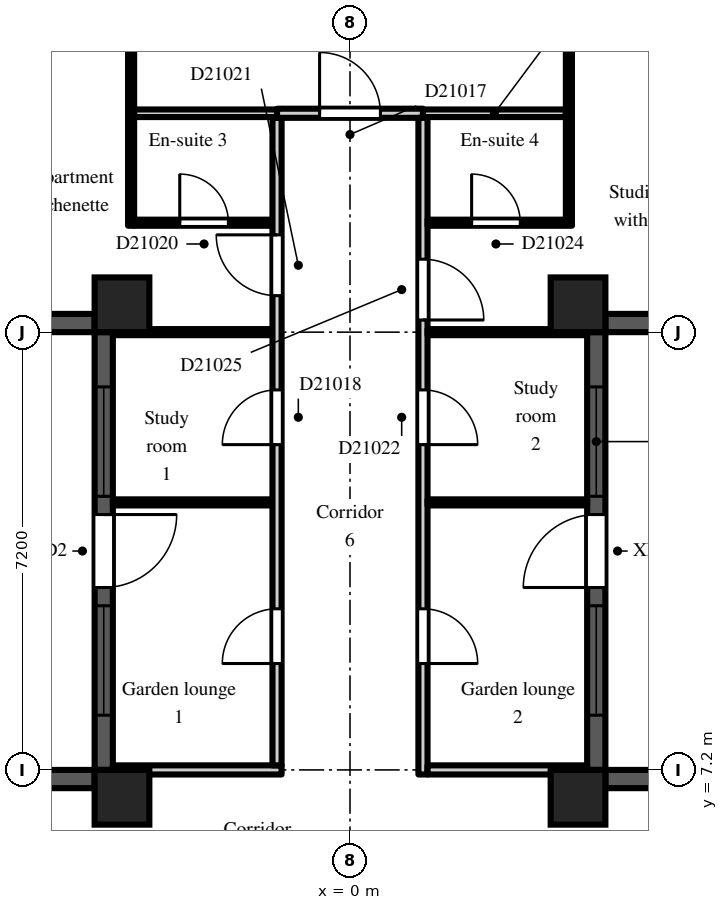
"""IFC4 building model, lengths in metres.
Left out: names, types, materials, properties, quantities, classifications, styles, units other than length and angle.
Written with IfcOpenShell. Run it as: python <this file> out.ifc"""

import sys

from ifc_helpers import new_model, si_unit, direction, frame, frame_2d, origin, origin_2d, place, context, subcontext, project, spatial, rectangle, extrude, element, fill, save


model = new_model("IFC4")
c1 = context("Model", 3, precision=1e-05, world=origin(), true_north=direction((0.0, 1.0)))
c2 = subcontext(c1, "Body", "Model", "MODEL_VIEW")
j1 = project(units=[si_unit("LENGTHUNIT", "METRE"), si_unit("PLANEANGLEUNIT", "RADIAN")], contexts=[c1])
p1 = place(None, origin())
s1 = spatial("IfcSite", under=j1, at=p1, CompositionType="ELEMENT")
p2 = place(p1, origin())
s2 = spatial("IfcBuilding", under=s1, at=p2, CompositionType="ELEMENT")
p3 = place(p2, frame((0.0, 0.0, 147.3)))
s3 = spatial("IfcBuildingStorey", under=s2, at=p3, CompositionType="ELEMENT", Elevation=147.3)
for number, where, z_axis, x_axis in (
    (1, (-3.75, 6.75, 0.0), (0.0, 0.0, 1.0), (1.0, 0.0, 0.0)),
    (2, (-3.75, 14.85, 0.0), (0.0, 0.0, 1.0), (1.0, 0.0, 0.0)),
    (3, (3.75, 6.75, 0.0), (0.0, 0.0, 1.0), (1.0, 0.0, 0.0)),
    (4, (3.75, 14.85, 0.0), (0.0, 0.0, 1.0), (1.0, 0.0, 0.0)),
):
    element("IfcColumn", number, at=place(p3, frame(where, z_axis=z_axis, x_axis=x_axis)), inside=s3, PredefinedType="COLUMN", context=c2, shape_type="SweptSolid", body=[
        extrude(rectangle(XDim=0.9, YDim=0.9, at=origin_2d()), origin(), (0.0, 0.0, 1.0), 3.0),
    ])
p4 = place(p3, frame((7.2, 7.05, 0.0), z_axis=(0.0, 0.0, 1.0), x_axis=(-1.0, 0.0, 0.0)))
e5 = element("IfcWall", 5, at=p4, inside=s3, PredefinedType="SOLIDWALL", context=c2, shape_type="SweptSolid", body=[
    extrude(rectangle(XDim=3.0, YDim=0.3, at=frame_2d((1.5, 0.0))), origin(), (0.0, 0.0, 1.0), 2.2),
])
p5 = place(p3, frame((4.05, 7.2, 0.0), z_axis=(0.0, 0.0, 1.0), x_axis=(0.0, 1.0, 0.0)))
e6 = element("IfcWall", 6, at=p5, inside=s3, PredefinedType="SOLIDWALL", context=c2, shape_type="SweptSolid", body=[
    extrude(rectangle(XDim=7.2, YDim=0.3, at=frame_2d((3.6, 0.0))), origin(), (0.0, 0.0, 1.0), 2.2),
])
p6 = place(p5, frame((3.0, 0.0, 0.0)))
e7 = element("IfcOpeningElement", 7, at=p6, cuts=e6, PredefinedType="OPENING", context=c2, shape_type="SweptSolid", body=[
    extrude(rectangle(XDim=1.2, YDim=2.05, at=frame_2d((0.6, 1.025))), frame((0.0, 0.16, 0.0), z_axis=(0.0, -1.0, 0.0), x_axis=(1.0, 0.0, 0.0)), (0.0, 0.0, 1.0), 0.32),
])
p7 = place(p5, frame((0.9, 0.0, 0.2)))
e8 = element("IfcOpeningElement", 8, at=p7, cuts=e6, PredefinedType="OPENING", context=c2, shape_type="SweptSolid", body=[
    extrude(rectangle(XDim=1.8, YDim=1.85, at=frame_2d((0.9, 0.925))), frame((0.0, 0.16, 0.0), z_axis=(0.0, -1.0, 0.0), x_axis=(1.0, 0.0, 0.0)), (0.0, 0.0, 1.0), 0.32),
])
p8 = place(p5, frame((4.5, 0.0, 0.2)))
e9 = element("IfcOpeningElement", 9, at=p8, cuts=e6, PredefinedType="OPENING", context=c2, shape_type="SweptSolid", body=[
    extrude(rectangle(XDim=1.8, YDim=1.85, at=frame_2d((0.9, 0.925))), frame((0.0, 0.16, 0.0), z_axis=(0.0, -1.0, 0.0), x_axis=(1.0, 0.0, 0.0)), (0.0, 0.0, 1.0), 0.32),
])
for number, where, z_axis, x_axis in (
    (10, (4.2, 14.55, 0.0), (0.0, 0.0, 1.0), (1.0, 0.0, 0.0)),
    (11, (-6.3, 14.55, 0.0), (0.0, 0.0, 1.0), (1.0, 0.0, 0.0)),
):
    element("IfcWall", number, at=place(p3, frame(where, z_axis=z_axis, x_axis=x_axis)), inside=s3, PredefinedType="SOLIDWALL", context=c2, shape_type="SweptSolid", body=[
        extrude(rectangle(XDim=2.1, YDim=0.3, at=frame_2d((1.05, 0.0))), origin(), (0.0, 0.0, 1.0), 2.2),
    ])
p9 = place(p3, frame((-4.05, 14.4, 0.0), z_axis=(0.0, 0.0, 1.0), x_axis=(0.0, -1.0, 0.0)))
e12 = element("IfcWall", 12, at=p9, inside=s3, PredefinedType="SOLIDWALL", context=c2, shape_type="SweptSolid", body=[
    extrude(rectangle(XDim=7.2, YDim=0.3, at=frame_2d((3.6, 0.0))), origin(), (0.0, 0.0, 1.0), 2.2),
])
p10 = place(p9, frame((3.0, 0.0, 0.0)))
e13 = element("IfcOpeningElement", 13, at=p10, cuts=e12, PredefinedType="OPENING", context=c2, shape_type="SweptSolid", body=[
    extrude(rectangle(XDim=1.2, YDim=2.05, at=frame_2d((0.6, 1.025))), frame((0.0, 0.16, 0.0), z_axis=(0.0, -1.0, 0.0), x_axis=(1.0, 0.0, 0.0)), (0.0, 0.0, 1.0), 0.32),
])
p11 = place(p9, frame((0.9, 0.0, 0.2)))
e14 = element("IfcOpeningElement", 14, at=p11, cuts=e12, PredefinedType="OPENING", context=c2, shape_type="SweptSolid", body=[
    extrude(rectangle(XDim=1.8, YDim=1.85, at=frame_2d((0.9, 0.925))), frame((0.0, 0.16, 0.0), z_axis=(0.0, -1.0, 0.0), x_axis=(1.0, 0.0, 0.0)), (0.0, 0.0, 1.0), 0.32),
])
p12 = place(p9, frame((4.5, 0.0, 0.2)))
e15 = element("IfcOpeningElement", 15, at=p12, cuts=e12, PredefinedType="OPENING", context=c2, shape_type="SweptSolid", body=[
    extrude(rectangle(XDim=1.8, YDim=1.85, at=frame_2d((0.9, 0.925))), frame((0.0, 0.16, 0.0), z_axis=(0.0, -1.0, 0.0), x_axis=(1.0, 0.0, 0.0)), (0.0, 0.0, 1.0), 0.32),
])
p13 = place(p3, frame((-4.2, 7.05, 0.0), z_axis=(0.0, 0.0, 1.0), x_axis=(-1.0, 0.0, 0.0)))
e16 = element("IfcWall", 16, at=p13, inside=s3, PredefinedType="SOLIDWALL", context=c2, shape_type="SweptSolid", body=[
    extrude(rectangle(XDim=3.0, YDim=0.3, at=frame_2d((1.5, 0.0))), origin(), (0.0, 0.0, 1.0), 2.2),
])
p14 = place(p3, frame((-3.9, 7.2, 0.0), z_axis=(0.0, 0.0, 1.0), x_axis=(1.0, 0.0, 0.0)))
e17 = element("IfcWall", 17, at=p14, inside=s3, PredefinedType="PARTITIONING", context=c2, shape_type="SweptSolid", body=[
    extrude(rectangle(XDim=2.775, YDim=0.15, at=frame_2d((1.387, 0.0))), origin(), (0.0, 0.0, 1.0), 2.6),
])
for number, where, z_axis, x_axis in (
    (18, (-3.9, 11.6, 0.0), (0.0, 0.0, 1.0), (1.0, 0.0, 0.0)),
    (19, (-3.9, 14.4, 0.0), (0.0, 0.0, 1.0), (1.0, 0.0, 0.0)),
):
    element("IfcWall", number, at=place(p3, frame(where, z_axis=z_axis, x_axis=x_axis)), inside=s3, PredefinedType="PARTITIONING", context=c2, shape_type="SweptSolid", body=[
        extrude(rectangle(XDim=2.625, YDim=0.1, at=frame_2d((1.312, 0.0))), origin(), (0.0, 0.0, 1.0), 2.6),
    ])
p15 = place(p3, frame((-3.6, 16.15, 0.0), z_axis=(0.0, 0.0, 1.0), x_axis=(0.0, 1.0, 0.0)))
e20 = element("IfcWall", 20, at=p15, inside=s3, PredefinedType="PARTITIONING", context=c2, shape_type="SweptSolid", body=[
    extrude(rectangle(XDim=3.35, YDim=0.1, at=frame_2d((1.675, 0.0))), origin(), (0.0, 0.0, 1.0), 2.6),
])
p16 = place(p3, frame((-3.55, 16.2, 0.0), z_axis=(0.0, 0.0, 1.0), x_axis=(1.0, 0.0, 0.0)))
e21 = element("IfcWall", 21, at=p16, inside=s3, PredefinedType="PARTITIONING", context=c2, shape_type="SweptSolid", body=[
    extrude(rectangle(XDim=2.275, YDim=0.1, at=frame_2d((1.138, 0.0))), origin(), (0.0, 0.0, 1.0), 2.6),
])
p17 = place(p16, frame((0.75, 0.0, 0.0)))
e22 = element("IfcOpeningElement", 22, at=p17, cuts=e21, PredefinedType="OPENING", context=c2, shape_type="SweptSolid", body=[
    extrude(rectangle(XDim=0.8, YDim=2.1, at=frame_2d((0.4, 1.05))), frame((0.0, 0.06, 0.0), z_axis=(0.0, -1.0, 0.0), x_axis=(1.0, 0.0, 0.0)), (0.0, 0.0, 1.0), 0.12),
])
p18 = place(p3, frame((-3.55, 18.0, 0.0), z_axis=(0.0, 0.0, 1.0), x_axis=(1.0, 0.0, 0.0)))
e23 = element("IfcWall", 23, at=p18, inside=s3, PredefinedType="PARTITIONING", context=c2, shape_type="SweptSolid", body=[
    extrude(rectangle(XDim=2.35, YDim=0.125, at=frame_2d((1.175, 0.0))), origin(), (0.0, 0.0, 1.0), 2.6),
])
p19 = place(p3, frame((-1.2, 7.275, 0.0), z_axis=(0.0, 0.0, 1.0), x_axis=(0.0, 1.0, 0.0)))
e24 = element("IfcWall", 24, at=p19, inside=s3, PredefinedType="PARTITIONING", context=c2, shape_type="SweptSolid", body=[
    extrude(rectangle(XDim=10.65, YDim=0.15, at=frame_2d((5.325, 0.0))), origin(), (0.0, 0.0, 1.0), 2.6),
])
p20 = place(p19, frame((5.275, 0.0, 0.0)))
e25 = element("IfcOpeningElement", 25, at=p20, cuts=e24, PredefinedType="OPENING", context=c2, shape_type="SweptSolid", body=[
    extrude(rectangle(XDim=0.9, YDim=2.1, at=frame_2d((0.45, 1.05))), frame((0.0, 0.085, 0.0), z_axis=(0.0, -1.0, 0.0), x_axis=(1.0, 0.0, 0.0)), (0.0, 0.0, 1.0), 0.17),
])
p21 = place(p19, frame((1.675, 0.0, 0.0)))
e26 = element("IfcOpeningElement", 26, at=p21, cuts=e24, PredefinedType="OPENING", context=c2, shape_type="SweptSolid", body=[
    extrude(rectangle(XDim=0.9, YDim=2.1, at=frame_2d((0.45, 1.05))), frame((0.0, 0.085, 0.0), z_axis=(0.0, -1.0, 0.0), x_axis=(1.0, 0.0, 0.0)), (0.0, 0.0, 1.0), 0.17),
])
p22 = place(p19, frame((7.725, 0.0, 0.0)))
e27 = element("IfcOpeningElement", 27, at=p22, cuts=e24, PredefinedType="OPENING", context=c2, shape_type="SweptSolid", body=[
    extrude(rectangle(XDim=1.0, YDim=2.1, at=frame_2d((0.5, 1.05))), frame((0.0, 0.085, 0.0), z_axis=(0.0, -1.0, 0.0), x_axis=(1.0, 0.0, 0.0)), (0.0, 0.0, 1.0), 0.17),
])
p23 = place(p3, frame((-1.2, 18.0, 0.0), z_axis=(0.0, 0.0, 1.0), x_axis=(1.0, 0.0, 0.0)))
e28 = element("IfcWall", 28, at=p23, inside=s3, PredefinedType="PARTITIONING", context=c2, shape_type="SweptSolid", body=[
    extrude(rectangle(XDim=2.4, YDim=0.15, at=frame_2d((1.2, 0.0))), origin(), (0.0, 0.0, 1.0), 2.6),
])
p24 = place(p23, frame((0.7, 0.0, 0.0)))
e29 = element("IfcOpeningElement", 29, at=p24, cuts=e28, PredefinedType="OPENING", context=c2, shape_type="SweptSolid", body=[
    extrude(rectangle(XDim=1.0, YDim=2.1, at=frame_2d((0.5, 1.05))), frame((0.0, 0.085, 0.0), z_axis=(0.0, -1.0, 0.0), x_axis=(1.0, 0.0, 0.0)), (0.0, 0.0, 1.0), 0.17),
])
p25 = place(p3, frame((1.2, 7.125, 0.0), z_axis=(0.0, 0.0, 1.0), x_axis=(0.0, 1.0, 0.0)))
e30 = element("IfcWall", 30, at=p25, inside=s3, PredefinedType="PARTITIONING", context=c2, shape_type="SweptSolid", body=[
    extrude(rectangle(XDim=10.8, YDim=0.15, at=frame_2d((5.4, 0.0))), origin(), (0.0, 0.0, 1.0), 2.6),
])
p26 = place(p25, frame((5.425, 0.0, 0.0)))
e31 = element("IfcOpeningElement", 31, at=p26, cuts=e30, PredefinedType="OPENING", context=c2, shape_type="SweptSolid", body=[
    extrude(rectangle(XDim=0.9, YDim=2.1, at=frame_2d((0.45, 1.05))), frame((0.0, 0.085, 0.0), z_axis=(0.0, -1.0, 0.0), x_axis=(1.0, 0.0, 0.0)), (0.0, 0.0, 1.0), 0.17),
])
p27 = place(p25, frame((1.825, 0.0, 0.0)))
e32 = element("IfcOpeningElement", 32, at=p27, cuts=e30, PredefinedType="OPENING", context=c2, shape_type="SweptSolid", body=[
    extrude(rectangle(XDim=0.9, YDim=2.1, at=frame_2d((0.45, 1.05))), frame((0.0, 0.085, 0.0), z_axis=(0.0, -1.0, 0.0), x_axis=(1.0, 0.0, 0.0)), (0.0, 0.0, 1.0), 0.17),
])
p28 = place(p25, frame((7.475, 0.0, 0.0)))
e33 = element("IfcOpeningElement", 33, at=p28, cuts=e30, PredefinedType="OPENING", context=c2, shape_type="SweptSolid", body=[
    extrude(rectangle(XDim=1.0, YDim=2.1, at=frame_2d((0.5, 1.05))), frame((0.0, 0.085, 0.0), z_axis=(0.0, -1.0, 0.0), x_axis=(1.0, 0.0, 0.0)), (0.0, 0.0, 1.0), 0.17),
])
p29 = place(p3, frame((1.275, 7.2, 0.0), z_axis=(0.0, 0.0, 1.0), x_axis=(1.0, 0.0, 0.0)))
e34 = element("IfcWall", 34, at=p29, inside=s3, PredefinedType="PARTITIONING", context=c2, shape_type="SweptSolid", body=[
    extrude(rectangle(XDim=2.625, YDim=0.15, at=frame_2d((1.312, 0.0))), origin(), (0.0, 0.0, 1.0), 2.6),
])
for number, where, z_axis, x_axis in (
    (35, (1.275, 11.6, 0.0), (0.0, 0.0, 1.0), (1.0, 0.0, 0.0)),
    (36, (1.275, 14.4, 0.0), (0.0, 0.0, 1.0), (1.0, 0.0, 0.0)),
):
    element("IfcWall", number, at=place(p3, frame(where, z_axis=z_axis, x_axis=x_axis)), inside=s3, PredefinedType="PARTITIONING", context=c2, shape_type="SweptSolid", body=[
        extrude(rectangle(XDim=2.625, YDim=0.1, at=frame_2d((1.312, 0.0))), origin(), (0.0, 0.0, 1.0), 2.6),
    ])
p30 = place(p3, frame((1.275, 16.2, 0.0), z_axis=(0.0, 0.0, 1.0), x_axis=(1.0, 0.0, 0.0)))
e37 = element("IfcWall", 37, at=p30, inside=s3, PredefinedType="PARTITIONING", context=c2, shape_type="SweptSolid", body=[
    extrude(rectangle(XDim=2.375, YDim=0.1, at=frame_2d((1.188, 0.0))), origin(), (0.0, 0.0, 1.0), 2.6),
])
p31 = place(p30, frame((0.725, 0.0, 0.0)))
e38 = element("IfcOpeningElement", 38, at=p31, cuts=e37, PredefinedType="OPENING", context=c2, shape_type="SweptSolid", body=[
    extrude(rectangle(XDim=0.8, YDim=2.1, at=frame_2d((0.4, 1.05))), frame((0.0, 0.06, 0.0), z_axis=(0.0, -1.0, 0.0), x_axis=(1.0, 0.0, 0.0)), (0.0, 0.0, 1.0), 0.12),
])
p32 = place(p3, frame((1.2, 18.0, 0.0), z_axis=(0.0, 0.0, 1.0), x_axis=(1.0, 0.0, 0.0)))
e39 = element("IfcWall", 39, at=p32, inside=s3, PredefinedType="PARTITIONING", context=c2, shape_type="SweptSolid", body=[
    extrude(rectangle(XDim=2.35, YDim=0.125, at=frame_2d((1.175, 0.0))), origin(), (0.0, 0.0, 1.0), 2.6),
])
p33 = place(p3, frame((3.6, 16.25, 0.0), z_axis=(0.0, 0.0, 1.0), x_axis=(0.0, 1.0, 0.0)))
e40 = element("IfcWall", 40, at=p33, inside=s3, PredefinedType="PARTITIONING", context=c2, shape_type="SweptSolid", body=[
    extrude(rectangle(XDim=3.25, YDim=0.1, at=frame_2d((1.625, 0.0))), origin(), (0.0, 0.0, 1.0), 2.6),
])
p34 = place(p6, origin())
e41 = element("IfcDoor", 41, at=p34, inside=s3, OperationType="SINGLE_SWING_LEFT", PredefinedType="DOOR", context=c2, shape_type="SweptSolid", body=[
    extrude(rectangle(XDim=1.2, YDim=2.05, at=frame_2d((0.6, 1.025))), frame((0.0, 0.025, 0.0), z_axis=(0.0, -1.0, 0.0), x_axis=(1.0, 0.0, 0.0)), (0.0, 0.0, 1.0), 0.05),
])
fill(e7, e41)
p35 = place(p7, origin())
e42 = element("IfcWindow", 42, at=p35, inside=s3, PartitioningType="SINGLE_PANEL", PredefinedType="WINDOW", context=c2, shape_type="SweptSolid", body=[
    extrude(rectangle(XDim=1.8, YDim=1.85, at=frame_2d((0.9, 0.925))), frame((0.0, 0.03, 0.0), z_axis=(0.0, -1.0, 0.0), x_axis=(1.0, 0.0, 0.0)), (0.0, 0.0, 1.0), 0.06),
])
fill(e8, e42)
p36 = place(p8, origin())
e43 = element("IfcWindow", 43, at=p36, inside=s3, PartitioningType="SINGLE_PANEL", PredefinedType="WINDOW", context=c2, shape_type="SweptSolid", body=[
    extrude(rectangle(XDim=1.8, YDim=1.85, at=frame_2d((0.9, 0.925))), frame((0.0, 0.03, 0.0), z_axis=(0.0, -1.0, 0.0), x_axis=(1.0, 0.0, 0.0)), (0.0, 0.0, 1.0), 0.06),
])
fill(e9, e43)
p37 = place(p10, origin())
e44 = element("IfcDoor", 44, at=p37, inside=s3, OperationType="SINGLE_SWING_LEFT", PredefinedType="DOOR", context=c2, shape_type="SweptSolid", body=[
    extrude(rectangle(XDim=1.2, YDim=2.05, at=frame_2d((0.6, 1.025))), frame((0.0, 0.025, 0.0), z_axis=(0.0, -1.0, 0.0), x_axis=(1.0, 0.0, 0.0)), (0.0, 0.0, 1.0), 0.05),
])
fill(e13, e44)
p38 = place(p11, origin())
e45 = element("IfcWindow", 45, at=p38, inside=s3, PartitioningType="SINGLE_PANEL", PredefinedType="WINDOW", context=c2, shape_type="SweptSolid", body=[
    extrude(rectangle(XDim=1.8, YDim=1.85, at=frame_2d((0.9, 0.925))), frame((0.0, 0.03, 0.0), z_axis=(0.0, -1.0, 0.0), x_axis=(1.0, 0.0, 0.0)), (0.0, 0.0, 1.0), 0.06),
])
fill(e14, e45)
p39 = place(p12, origin())
e46 = element("IfcWindow", 46, at=p39, inside=s3, PartitioningType="SINGLE_PANEL", PredefinedType="WINDOW", context=c2, shape_type="SweptSolid", body=[
    extrude(rectangle(XDim=1.8, YDim=1.85, at=frame_2d((0.9, 0.925))), frame((0.0, 0.03, 0.0), z_axis=(0.0, -1.0, 0.0), x_axis=(1.0, 0.0, 0.0)), (0.0, 0.0, 1.0), 0.06),
])
fill(e15, e46)
p40 = place(p24, origin())
e47 = element("IfcDoor", 47, at=p40, inside=s3, OperationType="SINGLE_SWING_LEFT", PredefinedType="DOOR", context=c2, shape_type="SweptSolid", body=[
    extrude(rectangle(XDim=1.0, YDim=2.1, at=frame_2d((0.5, 1.05))), frame((0.0, 0.025, 0.0), z_axis=(0.0, -1.0, 0.0), x_axis=(1.0, 0.0, 0.0)), (0.0, 0.0, 1.0), 0.05),
])
fill(e29, e47)
p41 = place(p20, origin())
e48 = element("IfcDoor", 48, at=p41, inside=s3, OperationType="SINGLE_SWING_LEFT", PredefinedType="DOOR", context=c2, shape_type="SweptSolid", body=[
    extrude(rectangle(XDim=0.9, YDim=2.1, at=frame_2d((0.45, 1.05))), frame((0.0, 0.025, 0.0), z_axis=(0.0, -1.0, 0.0), x_axis=(1.0, 0.0, 0.0)), (0.0, 0.0, 1.0), 0.05),
])
fill(e25, e48)
p42 = place(p21, origin())
e49 = element("IfcDoor", 49, at=p42, inside=s3, OperationType="SINGLE_SWING_LEFT", PredefinedType="DOOR", context=c2, shape_type="SweptSolid", body=[
    extrude(rectangle(XDim=0.9, YDim=2.1, at=frame_2d((0.45, 1.05))), frame((0.0, 0.025, 0.0), z_axis=(0.0, -1.0, 0.0), x_axis=(1.0, 0.0, 0.0)), (0.0, 0.0, 1.0), 0.05),
])
fill(e26, e49)
p43 = place(p17, origin())
e50 = element("IfcDoor", 50, at=p43, inside=s3, OperationType="SINGLE_SWING_LEFT", PredefinedType="DOOR", context=c2, shape_type="SweptSolid", body=[
    extrude(rectangle(XDim=0.8, YDim=2.1, at=frame_2d((0.4, 1.05))), frame((0.0, 0.025, 0.0), z_axis=(0.0, -1.0, 0.0), x_axis=(1.0, 0.0, 0.0)), (0.0, 0.0, 1.0), 0.05),
])
fill(e22, e50)
p44 = place(p22, origin())
e51 = element("IfcDoor", 51, at=p44, inside=s3, OperationType="SINGLE_SWING_RIGHT", PredefinedType="DOOR", context=c2, shape_type="SweptSolid", body=[
    extrude(rectangle(XDim=1.0, YDim=2.1, at=frame_2d((0.5, 1.05))), frame((0.0, 0.025, 0.0), z_axis=(0.0, -1.0, 0.0), x_axis=(1.0, 0.0, 0.0)), (0.0, 0.0, 1.0), 0.05),
])
fill(e27, e51)
p45 = place(p26, frame((0.9, 0.0, 0.0), z_axis=(0.0, 0.0, 1.0), x_axis=(-1.0, 0.0, 0.0)))
e52 = element("IfcDoor", 52, at=p45, inside=s3, OperationType="SINGLE_SWING_RIGHT", PredefinedType="DOOR", context=c2, shape_type="SweptSolid", body=[
    extrude(rectangle(XDim=0.9, YDim=2.1, at=frame_2d((0.45, 1.05))), frame((0.0, 0.025, 0.0), z_axis=(0.0, -1.0, 0.0), x_axis=(1.0, 0.0, 0.0)), (0.0, 0.0, 1.0), 0.05),
])
fill(e31, e52)
p46 = place(p27, frame((0.9, 0.0, 0.0), z_axis=(0.0, 0.0, 1.0), x_axis=(-1.0, 0.0, 0.0)))
e53 = element("IfcDoor", 53, at=p46, inside=s3, OperationType="SINGLE_SWING_RIGHT", PredefinedType="DOOR", context=c2, shape_type="SweptSolid", body=[
    extrude(rectangle(XDim=0.9, YDim=2.1, at=frame_2d((0.45, 1.05))), frame((0.0, 0.025, 0.0), z_axis=(0.0, -1.0, 0.0), x_axis=(1.0, 0.0, 0.0)), (0.0, 0.0, 1.0), 0.05),
])
fill(e32, e53)
p47 = place(p31, origin())
e54 = element("IfcDoor", 54, at=p47, inside=s3, OperationType="SINGLE_SWING_LEFT", PredefinedType="DOOR", context=c2, shape_type="SweptSolid", body=[
    extrude(rectangle(XDim=0.8, YDim=2.1, at=frame_2d((0.4, 1.05))), frame((0.0, 0.025, 0.0), z_axis=(0.0, -1.0, 0.0), x_axis=(1.0, 0.0, 0.0)), (0.0, 0.0, 1.0), 0.05),
])
fill(e38, e54)
p48 = place(p28, frame((1.0, 0.0, 0.0), z_axis=(0.0, 0.0, 1.0), x_axis=(-1.0, 0.0, 0.0)))
e55 = element("IfcDoor", 55, at=p48, inside=s3, OperationType="SINGLE_SWING_RIGHT", PredefinedType="DOOR", context=c2, shape_type="SweptSolid", body=[
    extrude(rectangle(XDim=1.0, YDim=2.1, at=frame_2d((0.5, 1.05))), frame((0.0, 0.025, 0.0), z_axis=(0.0, -1.0, 0.0), x_axis=(1.0, 0.0, 0.0)), (0.0, 0.0, 1.0), 0.05),
])
fill(e33, e55)
save(model, sys.argv[1])
